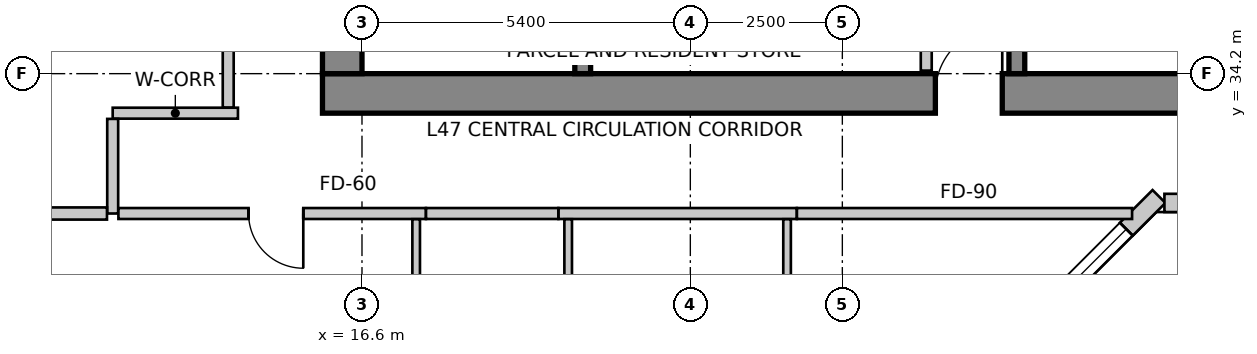
"""IFC4 building model, lengths in metres.
Left out: names, types, materials, properties, quantities, classifications, styles, units other than length and angle.
Written with IfcOpenShell. Run it as: python <this file> out.ifc"""

import sys

from ifc_helpers import new_model, si_unit, direction, frame, frame_2d, origin, place, context, subcontext, project, spatial, rectangle, extrude, source, transform, mapped, element, fill, save


model = new_model("IFC4")
c1 = context("Model", 3, precision=1e-05, world=origin(), true_north=direction((0.0, 1.0)))
c2 = subcontext(c1, "Body", "Model", "MODEL_VIEW")
j1 = project(units=[si_unit("LENGTHUNIT", "METRE"), si_unit("PLANEANGLEUNIT", "RADIAN")], contexts=[c1])
p1 = place(None, origin())
s1 = spatial("IfcSite", under=j1, at=p1, CompositionType="ELEMENT")
p2 = place(p1, origin())
s2 = spatial("IfcBuilding", under=s1, at=p2, CompositionType="ELEMENT")
p3 = place(p2, frame((0.0, 0.0, 190.4)))
s3 = spatial("IfcBuildingStorey", under=s2, at=p3, CompositionType="ELEMENT", Elevation=190.4)
p4 = place(p3, frame((15.95, 33.875, 0.0), z_axis=(0.0, 0.0, 1.0), x_axis=(1.0, 0.0, 0.0)))
e1 = element("IfcWall", 1, at=p4, inside=s3, PredefinedType="SHEAR", context=c2, shape_type="SweptSolid", body=[
    extrude(rectangle(XDim=15.7, YDim=0.65, at=frame_2d((7.85, 0.0))), origin(), (0.0, 0.0, 1.0), 3.5),
])
m1 = source(origin(), c2, "Body", "SweptSolid", [
    extrude(rectangle(XDim=1.1, YDim=2.15, at=frame_2d((0.55, 1.075))), frame((0.0, 0.335, 0.0), z_axis=(0.0, -1.0, 0.0), x_axis=(1.0, 0.0, 0.0)), (0.0, 0.0, 1.0), 0.67),
])
p5 = place(p4, frame((10.08, 0.0, 0.0)))
e2 = element("IfcOpeningElement", 2, at=p5, cuts=e1, PredefinedType="OPENING", context=c2, shape_type="MappedRepresentation", body=[
    mapped(m1, transform((0.0, 0.0, 0.0), scale=1.0)),
])
p6 = place(p3, frame((16.275, 34.2, 0.0), z_axis=(0.0, 0.0, 1.0), x_axis=(0.0, 1.0, 0.0)))
e3 = element("IfcWall", 3, at=p6, inside=s3, PredefinedType="SHEAR", context=c2, shape_type="SweptSolid", body=[
    extrude(rectangle(XDim=11.4, YDim=0.65, at=frame_2d((5.7, 0.0))), origin(), (0.0, 0.0, 1.0), 3.5),
])
p7 = place(p6, frame((7.15, 0.0, 0.0)))
e4 = element("IfcOpeningElement", 4, at=p7, cuts=e3, PredefinedType="OPENING", context=c2, shape_type="MappedRepresentation", body=[
    mapped(m1, transform((0.0, 0.0, 0.0), scale=1.0)),
])
p8 = place(p3, frame((20.23, 34.2, 0.0), z_axis=(0.0, 0.0, 1.0), x_axis=(0.0, 1.0, 0.0)))
e5 = element("IfcWall", 5, at=p8, inside=s3, PredefinedType="SHEAR", context=c2, shape_type="SweptSolid", body=[
    extrude(rectangle(XDim=9.06, YDim=0.26, at=frame_2d((4.53, 0.0))), origin(), (0.0, 0.0, 1.0), 3.5),
])
m2 = source(origin(), c2, "Body", "SweptSolid", [
    extrude(rectangle(XDim=1.1, YDim=2.15, at=frame_2d((0.55, 1.075))), frame((0.0, 0.14, 0.0), z_axis=(0.0, -1.0, 0.0), x_axis=(1.0, 0.0, 0.0)), (0.0, 0.0, 1.0), 0.28),
])
p9 = place(p8, frame((7.45, 0.0, 0.0)))
e6 = element("IfcOpeningElement", 6, at=p9, cuts=e5, PredefinedType="OPENING", context=c2, shape_type="MappedRepresentation", body=[
    mapped(m2, transform((0.0, 0.0, 0.0), scale=1.0)),
])
p10 = place(p3, frame((27.37, 34.2, 0.0), z_axis=(0.0, 0.0, 1.0), x_axis=(0.0, 1.0, 0.0)))
e7 = element("IfcWall", 7, at=p10, inside=s3, PredefinedType="SHEAR", context=c2, shape_type="SweptSolid", body=[
    extrude(rectangle(XDim=9.06, YDim=0.26, at=frame_2d((4.53, 0.0))), origin(), (0.0, 0.0, 1.0), 3.5),
])
p11 = place(p10, frame((7.45, 0.0, 0.0)))
e8 = element("IfcOpeningElement", 8, at=p11, cuts=e7, PredefinedType="OPENING", context=c2, shape_type="MappedRepresentation", body=[
    mapped(m2, transform((0.0, 0.0, 0.0), scale=1.0)),
])
p12 = place(p3, frame((27.652, 30.124, 0.0), z_axis=(0.0, 0.0, 1.0), x_axis=(0.707064797706, 0.707148762175, 0.0)))
e9 = element("IfcWall", 9, at=p12, inside=s3, PredefinedType="SOLIDWALL", context=c2, shape_type="SweptSolid", body=[
    extrude(rectangle(XDim=2.908, YDim=0.3, at=frame_2d((1.454, 0.0))), origin(), (0.0, 0.0, 1.0), 3.25),
])
m3 = source(origin(), c2, "Body", "SweptSolid", [
    extrude(rectangle(XDim=1.8, YDim=2.1, at=frame_2d((0.9, 1.05))), frame((0.0, 0.16, 0.0), z_axis=(0.0, -1.0, 0.0), x_axis=(1.0, 0.0, 0.0)), (0.0, 0.0, 1.0), 0.32),
])
p13 = place(p12, frame((0.348, 0.0, 0.85)))
e10 = element("IfcOpeningElement", 10, at=p13, cuts=e9, PredefinedType="OPENING", context=c2, shape_type="MappedRepresentation", body=[
    mapped(m3, transform((0.0, 0.0, 0.0), scale=1.0)),
])
p14 = place(p3, frame((29.797, 32.074, 0.0), z_axis=(0.0, 0.0, 1.0), x_axis=(1.0, 0.0, 0.0)))
e11 = element("IfcWall", 11, at=p14, inside=s3, PredefinedType="SOLIDWALL", context=c2, shape_type="SweptSolid", body=[
    extrude(rectangle(XDim=17.291, YDim=0.3, at=frame_2d((8.646, 0.0))), origin(), (0.0, 0.0, 1.0), 3.25),
])
m4 = source(origin(), c2, "Body", "SweptSolid", [
    extrude(rectangle(XDim=1.6, YDim=2.15, at=frame_2d((0.8, 1.075))), frame((0.0, 0.16, 0.0), z_axis=(0.0, -1.0, 0.0), x_axis=(1.0, 0.0, 0.0)), (0.0, 0.0, 1.0), 0.32),
])
p15 = place(p14, frame((4.053, 0.0, 0.0)))
e12 = element("IfcOpeningElement", 12, at=p15, cuts=e11, PredefinedType="OPENING", context=c2, shape_type="MappedRepresentation", body=[
    mapped(m4, transform((0.0, 0.0, 0.0), scale=1.0)),
])
m5 = source(origin(), c2, "Body", "SweptSolid", [
    extrude(rectangle(XDim=2.1, YDim=2.0, at=frame_2d((1.05, 1.0))), frame((0.0, 0.16, 0.0), z_axis=(0.0, -1.0, 0.0), x_axis=(1.0, 0.0, 0.0)), (0.0, 0.0, 1.0), 0.32),
])
p16 = place(p14, frame((0.676, 0.0, 0.85)))
e13 = element("IfcOpeningElement", 13, at=p16, cuts=e11, PredefinedType="OPENING", context=c2, shape_type="MappedRepresentation", body=[
    mapped(m5, transform((0.0, 0.0, 0.0), scale=1.0)),
])
p17 = place(p14, frame((8.661, 0.0, 0.85)))
e14 = element("IfcOpeningElement", 14, at=p17, cuts=e11, PredefinedType="OPENING", context=c2, shape_type="MappedRepresentation", body=[
    mapped(m5, transform((0.0, 0.0, 0.0), scale=1.0)),
])
p18 = place(p14, frame((14.205, 0.0, 0.85)))
e15 = element("IfcOpeningElement", 15, at=p18, cuts=e11, PredefinedType="OPENING", context=c2, shape_type="MappedRepresentation", body=[
    mapped(m5, transform((0.0, 0.0, 0.0), scale=1.0)),
])
p19 = place(p3, frame((13.269, 47.134, 0.0), z_axis=(0.0, 0.0, 1.0), x_axis=(-0.319920776449, -0.947444297464, 0.0)))
e16 = element("IfcWall", 16, at=p19, inside=s3, PredefinedType="SOLIDWALL", context=c2, shape_type="SweptSolid", body=[
    extrude(rectangle(XDim=16.133, YDim=0.3, at=frame_2d((8.067, 0.0))), origin(), (0.0, 0.0, 1.0), 3.25),
])
p20 = place(p19, frame((2.513, 0.0, 0.85)))
e17 = element("IfcOpeningElement", 17, at=p20, cuts=e16, PredefinedType="OPENING", context=c2, shape_type="MappedRepresentation", body=[
    mapped(m5, transform((0.0, 0.0, 0.0), scale=1.0)),
])
m6 = source(origin(), c2, "Body", "SweptSolid", [
    extrude(rectangle(XDim=2.4, YDim=2.2, at=frame_2d((1.2, 1.1))), frame((0.0, 0.16, 0.0), z_axis=(0.0, -1.0, 0.0), x_axis=(1.0, 0.0, 0.0)), (0.0, 0.0, 1.0), 0.32),
])
p21 = place(p19, frame((7.26, 0.0, 0.85)))
e18 = element("IfcOpeningElement", 18, at=p21, cuts=e16, PredefinedType="OPENING", context=c2, shape_type="MappedRepresentation", body=[
    mapped(m6, transform((0.0, 0.0, 0.0), scale=1.0)),
])
p22 = place(p19, frame((12.307, 0.0, 0.85)))
e19 = element("IfcOpeningElement", 19, at=p22, cuts=e16, PredefinedType="OPENING", context=c2, shape_type="MappedRepresentation", body=[
    mapped(m5, transform((0.0, 0.0, 0.0), scale=1.0)),
])
p23 = place(p3, frame((8.188, 31.834, 0.0), z_axis=(0.0, 0.0, 1.0), x_axis=(0.202303475707, -0.979322880217, 0.0)))
e20 = element("IfcWall", 20, at=p23, inside=s3, PredefinedType="SOLIDWALL", context=c2, shape_type="SweptSolid", body=[
    extrude(rectangle(XDim=15.766, YDim=0.3, at=frame_2d((7.883, 0.0))), origin(), (0.0, 0.0, 1.0), 3.25),
])
p24 = place(p23, frame((1.404, 0.0, 0.85)))
e21 = element("IfcOpeningElement", 21, at=p24, cuts=e20, PredefinedType="OPENING", context=c2, shape_type="MappedRepresentation", body=[
    mapped(m6, transform((0.0, 0.0, 0.0), scale=1.0)),
])
p25 = place(p23, frame((6.121, 0.0, 0.85)))
e22 = element("IfcOpeningElement", 22, at=p25, cuts=e20, PredefinedType="OPENING", context=c2, shape_type="MappedRepresentation", body=[
    mapped(m5, transform((0.0, 0.0, 0.0), scale=1.0)),
])
p26 = place(p23, frame((11.47, 0.0, 0.85)))
e23 = element("IfcOpeningElement", 23, at=p26, cuts=e20, PredefinedType="OPENING", context=c2, shape_type="MappedRepresentation", body=[
    mapped(m6, transform((0.0, 0.0, 0.0), scale=1.0)),
])
p27 = place(p3, frame((25.88, 35.956, 0.0), z_axis=(0.0, 0.0, 1.0), x_axis=(0.0, -1.0, 0.0)))
e24 = element("IfcWall", 24, at=p27, inside=s3, PredefinedType="PARTITIONING", context=c2, shape_type="SweptSolid", body=[
    extrude(rectangle(XDim=1.706, YDim=0.18, at=frame_2d((0.853, 0.0))), origin(), (0.0, 0.0, 1.0), 2.542),
])
p28 = place(p3, frame((12.5, 33.55, 0.0), z_axis=(0.0, 0.0, 1.0), x_axis=(1.0, 0.0, 0.0)))
e25 = element("IfcWall", 25, at=p28, inside=s3, PredefinedType="PARTITIONING", context=c2, shape_type="SweptSolid", body=[
    extrude(rectangle(XDim=2.06, YDim=0.18, at=frame_2d((1.03, 0.0))), origin(), (0.0, 0.0, 1.0), 3.25),
])
p29 = place(p3, frame((12.5, 31.9, 0.0), z_axis=(0.0, 0.0, 1.0), x_axis=(0.0, 1.0, 0.0)))
e26 = element("IfcWall", 26, at=p29, inside=s3, PredefinedType="PARTITIONING", context=c2, shape_type="SweptSolid", body=[
    extrude(rectangle(XDim=1.556, YDim=0.18, at=frame_2d((0.778, 0.0))), origin(), (0.0, 0.0, 1.0), 2.934),
])
p30 = place(p3, frame((23.751, 31.9, 0.0), z_axis=(0.0, 0.0, 1.0), x_axis=(-1.0, 0.0, 0.0)))
e27 = element("IfcWall", 27, at=p30, inside=s3, PredefinedType="PARTITIONING", context=c2, shape_type="SweptSolid", body=[
    extrude(rectangle(XDim=3.92, YDim=0.18, at=frame_2d((1.96, 0.0))), origin(), (0.0, 0.0, 1.0), 2.934),
])
p31 = place(p3, frame((29.265, 31.9, 0.0), z_axis=(0.0, 0.0, 1.0), x_axis=(-1.0, 0.0, 0.0)))
e28 = element("IfcWall", 28, at=p31, inside=s3, PredefinedType="PARTITIONING", context=c2, shape_type="SweptSolid", body=[
    extrude(rectangle(XDim=5.512, YDim=0.18, at=frame_2d((2.756, 0.0))), origin(), (0.0, 0.0, 1.0), 3.25),
])
p32 = place(p3, frame((17.651, 31.9, 0.0), z_axis=(0.0, 0.0, 1.0), x_axis=(-1.0, 0.0, 0.0)))
e29 = element("IfcWall", 29, at=p32, inside=s3, PredefinedType="PARTITIONING", context=c2, shape_type="SweptSolid", body=[
    extrude(rectangle(XDim=5.057, YDim=0.18, at=frame_2d((2.528, 0.0))), origin(), (0.0, 0.0, 1.0), 2.934),
])
m7 = source(origin(), c2, "Body", "SweptSolid", [
    extrude(rectangle(XDim=0.9, YDim=2.15, at=frame_2d((0.45, 1.075))), frame((0.0, 0.1, 0.0), z_axis=(0.0, -1.0, 0.0), x_axis=(1.0, 0.0, 0.0)), (0.0, 0.0, 1.0), 0.2),
])
p33 = place(p32, frame((2.017, 0.0, 0.0)))
e30 = element("IfcOpeningElement", 30, at=p33, cuts=e29, PredefinedType="OPENING", context=c2, shape_type="MappedRepresentation", body=[
    mapped(m7, transform((0.0, 0.0, 0.0), scale=1.0)),
])
p34 = place(p3, frame((19.829, 31.9, 0.0), z_axis=(0.0, 0.0, 1.0), x_axis=(-1.0, 0.0, 0.0)))
e31 = element("IfcWall", 31, at=p34, inside=s3, PredefinedType="PARTITIONING", context=c2, shape_type="SweptSolid", body=[
    extrude(rectangle(XDim=2.176, YDim=0.18, at=frame_2d((1.088, 0.0))), origin(), (0.0, 0.0, 1.0), 3.25),
])
p35 = place(p3, frame((14.4, 33.644, 0.0), z_axis=(0.0, 0.0, 1.0), x_axis=(0.0, 1.0, 0.0)))
e32 = element("IfcWall", 32, at=p35, inside=s3, PredefinedType="PARTITIONING", context=c2, shape_type="SweptSolid", body=[
    extrude(rectangle(XDim=12.606, YDim=0.18, at=frame_2d((6.303, 0.0))), origin(), (0.0, 0.0, 1.0), 3.25),
])
p36 = place(p35, frame((4.399, 0.0, 0.0)))
e33 = element("IfcOpeningElement", 33, at=p36, cuts=e32, PredefinedType="OPENING", context=c2, shape_type="MappedRepresentation", body=[
    mapped(m7, transform((0.0, 0.0, 0.0), scale=1.0)),
])
p37 = place(p3, frame((12.406, 31.9, 0.0), z_axis=(0.0, 0.0, 1.0), x_axis=(-1.0, 0.0, 0.0)))
e34 = element("IfcWall", 34, at=p37, inside=s3, PredefinedType="PARTITIONING", context=c2, shape_type="SweptSolid", body=[
    extrude(rectangle(XDim=4.115, YDim=0.2, at=frame_2d((2.057, 0.0))), origin(), (0.0, 0.0, 1.0), 2.542),
])
p38 = place(p3, frame((23.591, 31.806, 0.0), z_axis=(0.0, 0.0, 1.0), x_axis=(0.0, -1.0, 0.0)))
e35 = element("IfcWall", 35, at=p38, inside=s3, PredefinedType="PARTITIONING", context=c2, shape_type="SweptSolid", body=[
    extrude(rectangle(XDim=9.423, YDim=0.125, at=frame_2d((4.711, 0.0))), origin(), (0.0, 0.0, 1.0), 2.542),
])
m8 = source(origin(), c2, "Body", "SweptSolid", [
    extrude(rectangle(XDim=0.9, YDim=2.15, at=frame_2d((0.45, 1.075))), frame((0.0, 0.073, 0.0), z_axis=(0.0, -1.0, 0.0), x_axis=(1.0, 0.0, 0.0)), (0.0, 0.0, 1.0), 0.145),
])
p39 = place(p38, frame((5.106, 0.0, 0.0)))
e36 = element("IfcOpeningElement", 36, at=p39, cuts=e35, PredefinedType="OPENING", context=c2, shape_type="MappedRepresentation", body=[
    mapped(m8, transform((0.0, 0.0, 0.0), scale=1.0)),
])
p40 = place(p3, frame((19.991, 22.383, 0.0), z_axis=(0.0, 0.0, 1.0), x_axis=(0.0, 1.0, 0.0)))
e37 = element("IfcWall", 37, at=p40, inside=s3, PredefinedType="PARTITIONING", context=c2, shape_type="SweptSolid", body=[
    extrude(rectangle(XDim=9.423, YDim=0.125, at=frame_2d((4.711, 0.0))), origin(), (0.0, 0.0, 1.0), 2.766),
])
p41 = place(p40, frame((4.261, 0.0, 0.0)))
e38 = element("IfcOpeningElement", 38, at=p41, cuts=e37, PredefinedType="OPENING", context=c2, shape_type="MappedRepresentation", body=[
    mapped(m8, transform((0.0, 0.0, 0.0), scale=1.0)),
])
p42 = place(p3, frame((17.491, 31.806, 0.0), z_axis=(0.0, 0.0, 1.0), x_axis=(0.0, -1.0, 0.0)))
e39 = element("IfcWall", 39, at=p42, inside=s3, PredefinedType="PARTITIONING", context=c2, shape_type="SweptSolid", body=[
    extrude(rectangle(XDim=9.423, YDim=0.125, at=frame_2d((4.711, 0.0))), origin(), (0.0, 0.0, 1.0), 2.766),
])
m9 = source(origin(), c2, "Body", "SweptSolid", [
    extrude(rectangle(XDim=0.85, YDim=2.15, at=frame_2d((0.425, 1.075))), frame((0.0, 0.073, 0.0), z_axis=(0.0, -1.0, 0.0), x_axis=(1.0, 0.0, 0.0)), (0.0, 0.0, 1.0), 0.145),
])
p43 = place(p42, frame((4.287, 0.0, 0.0)))
e40 = element("IfcOpeningElement", 40, at=p43, cuts=e39, PredefinedType="OPENING", context=c2, shape_type="MappedRepresentation", body=[
    mapped(m9, transform((0.0, 0.0, 0.0), scale=1.0)),
])
m10 = source(origin(), c2, "Body", "SweptSolid", [
    extrude(rectangle(XDim=1.8, YDim=2.1, at=frame_2d((0.9, 1.05))), frame((0.0, -0.015, 0.0), z_axis=(0.0, -1.0, 0.0), x_axis=(1.0, 0.0, 0.0)), (0.0, 0.0, 1.0), 0.06),
])
p44 = place(p13, origin())
e41 = element("IfcWindow", 41, at=p44, inside=s3, PartitioningType="SINGLE_PANEL", PredefinedType="WINDOW", context=c2, shape_type="MappedRepresentation", body=[
    mapped(m10, transform((0.0, 0.0, 0.0), scale=1.0)),
])
fill(e10, e41)
m11 = source(origin(), c2, "Body", "SweptSolid", [
    extrude(rectangle(XDim=1.1, YDim=2.15, at=frame_2d((0.55, 1.075))), frame((0.0, 0.025, 0.0), z_axis=(0.0, -1.0, 0.0), x_axis=(1.0, 0.0, 0.0)), (0.0, 0.0, 1.0), 0.05),
])
p45 = place(p5, origin())
e42 = element("IfcDoor", 42, at=p45, inside=s3, OperationType="SINGLE_SWING_RIGHT", PredefinedType="DOOR", context=c2, shape_type="MappedRepresentation", body=[
    mapped(m11, transform((0.0, 0.0, 0.0), scale=1.0)),
])
fill(e2, e42)
m12 = source(origin(), c2, "Body", "SweptSolid", [
    extrude(rectangle(XDim=0.9, YDim=2.15, at=frame_2d((0.45, 1.075))), frame((0.0, 0.025, 0.0), z_axis=(0.0, -1.0, 0.0), x_axis=(1.0, 0.0, 0.0)), (0.0, 0.0, 1.0), 0.05),
])
p46 = place(p33, origin())
e43 = element("IfcDoor", 43, at=p46, inside=s3, OperationType="SINGLE_SWING_LEFT", PredefinedType="DOOR", context=c2, shape_type="MappedRepresentation", body=[
    mapped(m12, transform((0.0, 0.0, 0.0), scale=1.0)),
])
fill(e30, e43)
save(model, sys.argv[1])
